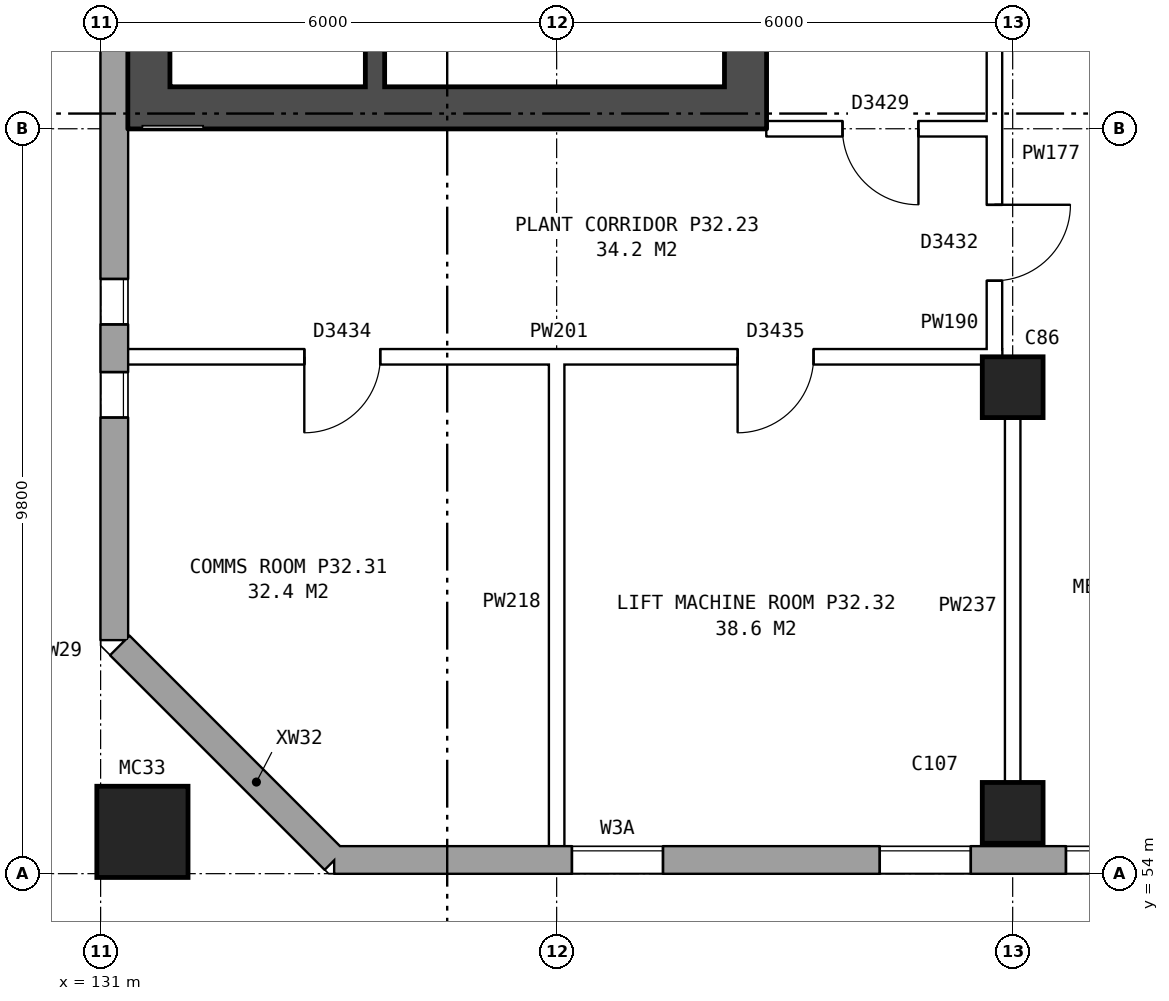
"""IFC4 building model, lengths in metres.
Left out: names, types, materials, properties, quantities, classifications, styles, units other than length and angle.
Written with IfcOpenShell. Run it as: python <this file> out.ifc"""

import sys

from ifc_helpers import new_model, si_unit, direction, frame, frame_2d, origin, origin_2d, place, context, subcontext, project, spatial, rectangle, hollow_rectangle, extrude, element, fill, save


model = new_model("IFC4")
c1 = context("Model", 3, precision=1e-05, world=origin(), true_north=direction((0.0, 1.0)))
c2 = subcontext(c1, "Body", "Model", "MODEL_VIEW")
j1 = project(units=[si_unit("LENGTHUNIT", "METRE"), si_unit("PLANEANGLEUNIT", "RADIAN")], contexts=[c1])
p1 = place(None, origin())
s1 = spatial("IfcSite", under=j1, at=p1, CompositionType="ELEMENT")
p2 = place(p1, origin())
s2 = spatial("IfcBuilding", under=s1, at=p2, CompositionType="ELEMENT")
p3 = place(p2, frame((0.0, 0.0, 115.0)))
s3 = spatial("IfcBuildingStorey", under=s2, at=p3, CompositionType="ELEMENT", Elevation=115.0)
for number, where, z_axis, x_axis in (
    (1, (143.0, 54.8, 0.0), (0.0, 0.0, 1.0), (1.0, 0.0, 0.0)),
    (2, (143.0, 60.4, 0.0), (0.0, 0.0, 1.0), (1.0, 0.0, 0.0)),
):
    element("IfcColumn", number, at=place(p3, frame(where, z_axis=z_axis, x_axis=x_axis)), inside=s3, PredefinedType="COLUMN", context=c2, shape_type="SweptSolid", body=[
        extrude(rectangle(XDim=0.8, YDim=0.8, at=origin_2d()), origin(), (0.0, 0.0, 1.0), 4.2),
    ])
p4 = place(p3, frame((131.55, 54.55, 0.0), z_axis=(0.0, 0.0, 1.0), x_axis=(1.0, 0.0, 0.0)))
e3 = element("IfcColumn", 3, at=p4, inside=s3, PredefinedType="COLUMN", context=c2, shape_type="SweptSolid", body=[
    extrude(hollow_rectangle(XDim=1.2, YDim=1.2, WallThickness=0.065, at=origin_2d()), origin(), (0.0, 0.0, 1.0), 4.5),
])
p5 = place(p3, frame((131.254, 57.001, 0.953), z_axis=(0.0, 0.0, 1.0), x_axis=(0.706994764273, -0.707218780358, 0.0)))
e4 = element("IfcWall", 4, at=p5, inside=s3, PredefinedType="STANDARD", context=c2, shape_type="SweptSolid", body=[
    extrude(rectangle(XDim=1.09, YDim=0.36, at=frame_2d((0.545, 0.0))), origin(), (0.0, 0.0, 1.0), 2.444),
])
p6 = place(p3, frame((132.024, 56.23, 0.0), z_axis=(0.0, 0.0, 1.0), x_axis=(0.707148882153, -0.707064677713, 0.0)))
e5 = element("IfcWall", 5, at=p6, inside=s3, PredefinedType="STANDARD", context=c2, shape_type="SweptSolid", body=[
    extrude(rectangle(XDim=2.899, YDim=0.36, at=frame_2d((1.45, 0.0))), origin(), (0.0, 0.0, 1.0), 4.2),
])
p7 = place(p3, frame((134.075, 54.18, 0.0), z_axis=(0.0, 0.0, 1.0), x_axis=(1.0, 0.0, 0.0)))
e6 = element("IfcWall", 6, at=p7, inside=s3, PredefinedType="STANDARD", context=c2, shape_type="SweptSolid", body=[
    extrude(rectangle(XDim=35.601, YDim=0.36, at=frame_2d((17.8, 0.0))), origin(), (0.0, 0.0, 1.0), 4.2),
])
p8 = place(p7, frame((3.125, 0.0, 1.5)))
e7 = element("IfcOpeningElement", 7, at=p8, cuts=e6, PredefinedType="OPENING", context=c2, shape_type="SweptSolid", body=[
    extrude(rectangle(XDim=1.2, YDim=1.2, at=frame_2d((0.6, 0.6))), frame((0.0, 0.19, 0.0), z_axis=(0.0, -1.0, 0.0), x_axis=(1.0, 0.0, 0.0)), (0.0, 0.0, 1.0), 0.38),
])
p9 = place(p7, frame((7.175, 0.0, 1.5)))
e8 = element("IfcOpeningElement", 8, at=p9, cuts=e6, PredefinedType="OPENING", context=c2, shape_type="SweptSolid", body=[
    extrude(rectangle(XDim=1.2, YDim=1.2, at=frame_2d((0.6, 0.6))), frame((0.0, 0.19, 0.0), z_axis=(0.0, -1.0, 0.0), x_axis=(1.0, 0.0, 0.0)), (0.0, 0.0, 1.0), 0.38),
])
p10 = place(p7, frame((9.625, 0.0, 1.5)))
e9 = element("IfcOpeningElement", 9, at=p10, cuts=e6, PredefinedType="OPENING", context=c2, shape_type="SweptSolid", body=[
    extrude(rectangle(XDim=1.6, YDim=1.2, at=frame_2d((0.8, 0.6))), frame((0.0, 0.19, 0.0), z_axis=(0.0, -1.0, 0.0), x_axis=(1.0, 0.0, 0.0)), (0.0, 0.0, 1.0), 0.38),
])
p11 = place(p7, frame((15.125, 0.0, 1.5)))
e10 = element("IfcOpeningElement", 10, at=p11, cuts=e6, PredefinedType="OPENING", context=c2, shape_type="SweptSolid", body=[
    extrude(rectangle(XDim=1.2, YDim=1.2, at=frame_2d((0.6, 0.6))), frame((0.0, 0.19, 0.0), z_axis=(0.0, -1.0, 0.0), x_axis=(1.0, 0.0, 0.0)), (0.0, 0.0, 1.0), 0.38),
])
p12 = place(p7, frame((19.125, 0.0, 1.5)))
e11 = element("IfcOpeningElement", 11, at=p12, cuts=e6, PredefinedType="OPENING", context=c2, shape_type="SweptSolid", body=[
    extrude(rectangle(XDim=0.6, YDim=1.2, at=frame_2d((0.3, 0.6))), frame((0.0, 0.19, 0.0), z_axis=(0.0, -1.0, 0.0), x_axis=(1.0, 0.0, 0.0)), (0.0, 0.0, 1.0), 0.38),
])
p13 = place(p7, frame((21.625, 0.0, 1.5)))
e12 = element("IfcOpeningElement", 12, at=p13, cuts=e6, PredefinedType="OPENING", context=c2, shape_type="SweptSolid", body=[
    extrude(rectangle(XDim=1.6, YDim=1.2, at=frame_2d((0.8, 0.6))), frame((0.0, 0.19, 0.0), z_axis=(0.0, -1.0, 0.0), x_axis=(1.0, 0.0, 0.0)), (0.0, 0.0, 1.0), 0.38),
])
p14 = place(p7, frame((26.375, 0.0, 1.5)))
e13 = element("IfcOpeningElement", 13, at=p14, cuts=e6, PredefinedType="OPENING", context=c2, shape_type="SweptSolid", body=[
    extrude(rectangle(XDim=1.6, YDim=1.2, at=frame_2d((0.8, 0.6))), frame((0.0, 0.19, 0.0), z_axis=(0.0, -1.0, 0.0), x_axis=(1.0, 0.0, 0.0)), (0.0, 0.0, 1.0), 0.38),
])
p15 = place(p7, frame((31.125, 0.0, 1.5)))
e14 = element("IfcOpeningElement", 14, at=p15, cuts=e6, PredefinedType="OPENING", context=c2, shape_type="SweptSolid", body=[
    extrude(rectangle(XDim=0.6, YDim=1.2, at=frame_2d((0.3, 0.6))), frame((0.0, 0.19, 0.0), z_axis=(0.0, -1.0, 0.0), x_axis=(1.0, 0.0, 0.0)), (0.0, 0.0, 1.0), 0.38),
])
p16 = place(p7, frame((33.625, 0.0, 1.5)))
e15 = element("IfcOpeningElement", 15, at=p16, cuts=e6, PredefinedType="OPENING", context=c2, shape_type="SweptSolid", body=[
    extrude(rectangle(XDim=1.6, YDim=1.2, at=frame_2d((0.8, 0.6))), frame((0.0, 0.19, 0.0), z_axis=(0.0, -1.0, 0.0), x_axis=(1.0, 0.0, 0.0)), (0.0, 0.0, 1.0), 0.38),
])
p17 = place(p7, frame((20.025, 0.0, 1.5)))
e16 = element("IfcOpeningElement", 16, at=p17, cuts=e6, PredefinedType="OPENING", context=c2, shape_type="SweptSolid", body=[
    extrude(rectangle(XDim=1.2, YDim=1.2, at=frame_2d((0.6, 0.6))), frame((0.0, 0.19, 0.0), z_axis=(0.0, -1.0, 0.0), x_axis=(1.0, 0.0, 0.0)), (0.0, 0.0, 1.0), 0.38),
])
p18 = place(p7, frame((32.025, 0.0, 1.5)))
e17 = element("IfcOpeningElement", 17, at=p18, cuts=e6, PredefinedType="OPENING", context=c2, shape_type="SweptSolid", body=[
    extrude(rectangle(XDim=1.2, YDim=1.2, at=frame_2d((0.6, 0.6))), frame((0.0, 0.19, 0.0), z_axis=(0.0, -1.0, 0.0), x_axis=(1.0, 0.0, 0.0)), (0.0, 0.0, 1.0), 0.38),
])
p19 = place(p3, frame((131.18, 82.925, 0.0), z_axis=(0.0, 0.0, 1.0), x_axis=(0.0, -1.0, 0.0)))
e18 = element("IfcWall", 18, at=p19, inside=s3, PredefinedType="STANDARD", context=c2, shape_type="SweptSolid", body=[
    extrude(rectangle(XDim=25.851, YDim=0.36, at=frame_2d((12.925, 0.0))), origin(), (0.0, 0.0, 1.0), 4.2),
])
p20 = place(p19, frame((2.9, 0.0, 1.5)))
e19 = element("IfcOpeningElement", 19, at=p20, cuts=e18, PredefinedType="OPENING", context=c2, shape_type="SweptSolid", body=[
    extrude(rectangle(XDim=0.6, YDim=1.2, at=frame_2d((0.3, 0.6))), frame((0.0, 0.19, 0.0), z_axis=(0.0, -1.0, 0.0), x_axis=(1.0, 0.0, 0.0)), (0.0, 0.0, 1.0), 0.38),
])
p21 = place(p19, frame((4.625, 0.0, 1.5)))
e20 = element("IfcOpeningElement", 20, at=p21, cuts=e18, PredefinedType="OPENING", context=c2, shape_type="SweptSolid", body=[
    extrude(rectangle(XDim=1.6, YDim=1.2, at=frame_2d((0.8, 0.6))), frame((0.0, 0.19, 0.0), z_axis=(0.0, -1.0, 0.0), x_axis=(1.0, 0.0, 0.0)), (0.0, 0.0, 1.0), 0.38),
])
p22 = place(p19, frame((21.1, 0.0, 1.5)))
e21 = element("IfcOpeningElement", 21, at=p22, cuts=e18, PredefinedType="OPENING", context=c2, shape_type="SweptSolid", body=[
    extrude(rectangle(XDim=0.6, YDim=1.2, at=frame_2d((0.3, 0.6))), frame((0.0, 0.19, 0.0), z_axis=(0.0, -1.0, 0.0), x_axis=(1.0, 0.0, 0.0)), (0.0, 0.0, 1.0), 0.38),
])
p23 = place(p19, frame((22.325, 0.0, 1.5)))
e22 = element("IfcOpeningElement", 22, at=p23, cuts=e18, PredefinedType="OPENING", context=c2, shape_type="SweptSolid", body=[
    extrude(rectangle(XDim=0.6, YDim=1.2, at=frame_2d((0.3, 0.6))), frame((0.0, 0.19, 0.0), z_axis=(0.0, -1.0, 0.0), x_axis=(1.0, 0.0, 0.0)), (0.0, 0.0, 1.0), 0.38),
])
p24 = place(p3, frame((139.485, 63.8, 0.0), z_axis=(0.0, 0.0, 1.0), x_axis=(0.0, 1.0, 0.0)))
e23 = element("IfcWall", 23, at=p24, inside=s3, PredefinedType="SHEAR", context=c2, shape_type="SweptSolid", body=[
    extrude(rectangle(XDim=12.4, YDim=0.55, at=frame_2d((6.2, 0.0))), origin(), (0.0, 0.0, 1.0), 4.2),
])
p25 = place(p24, frame((1.325, 0.0, 0.0)))
e24 = element("IfcOpeningElement", 24, at=p25, cuts=e23, PredefinedType="OPENING", context=c2, shape_type="SweptSolid", body=[
    extrude(rectangle(XDim=1.1, YDim=2.1, at=frame_2d((0.55, 1.05))), frame((0.0, 0.285, 0.0), z_axis=(0.0, -1.0, 0.0), x_axis=(1.0, 0.0, 0.0)), (0.0, 0.0, 1.0), 0.57),
])
p26 = place(p24, frame((9.9, 0.0, 0.0)))
e25 = element("IfcOpeningElement", 25, at=p26, cuts=e23, PredefinedType="OPENING", context=c2, shape_type="SweptSolid", body=[
    extrude(rectangle(XDim=1.1, YDim=2.1, at=frame_2d((0.55, 1.05))), frame((0.0, 0.285, 0.0), z_axis=(0.0, -1.0, 0.0), x_axis=(1.0, 0.0, 0.0)), (0.0, 0.0, 1.0), 0.57),
])
p27 = place(p24, frame((8.125, 0.0, 0.0)))
e26 = element("IfcOpeningElement", 26, at=p27, cuts=e23, PredefinedType="OPENING", context=c2, shape_type="SweptSolid", body=[
    extrude(rectangle(XDim=0.85, YDim=2.1, at=frame_2d((0.425, 1.05))), frame((0.0, 0.285, 0.0), z_axis=(0.0, -1.0, 0.0), x_axis=(1.0, 0.0, 0.0)), (0.0, 0.0, 1.0), 0.57),
])
p28 = place(p3, frame((131.635, 63.8, 0.0), z_axis=(0.0, 0.0, 1.0), x_axis=(0.0, 1.0, 0.0)))
e27 = element("IfcWall", 27, at=p28, inside=s3, PredefinedType="SHEAR", context=c2, shape_type="SweptSolid", body=[
    extrude(rectangle(XDim=12.4, YDim=0.55, at=frame_2d((6.2, 0.0))), origin(), (0.0, 0.0, 1.0), 4.2),
])
p29 = place(p3, frame((139.21, 64.075, 0.0), z_axis=(0.0, 0.0, 1.0), x_axis=(-1.0, 0.0, 0.0)))
e28 = element("IfcWall", 28, at=p29, inside=s3, PredefinedType="SHEAR", context=c2, shape_type="SweptSolid", body=[
    extrude(rectangle(XDim=7.3, YDim=0.55, at=frame_2d((3.65, 0.0))), origin(), (0.0, 0.0, 1.0), 4.2),
])
p30 = place(p3, frame((134.61, 64.35, 0.0), z_axis=(0.0, 0.0, 1.0), x_axis=(0.0, 1.0, 0.0)))
e29 = element("IfcWall", 29, at=p30, inside=s3, PredefinedType="SHEAR", context=c2, shape_type="SweptSolid", body=[
    extrude(rectangle(XDim=6.775, YDim=0.25, at=frame_2d((3.387, 0.0))), origin(), (0.0, 0.0, 1.0), 4.2),
])
p31 = place(p3, frame((142.76, 63.9, 0.0), z_axis=(0.0, 0.0, 1.0), x_axis=(0.0, 1.0, 0.0)))
e30 = element("IfcWall", 30, at=p31, inside=s3, PredefinedType="PARTITIONING", context=c2, shape_type="SweptSolid", body=[
    extrude(rectangle(XDim=12.2, YDim=0.2, at=frame_2d((6.1, 0.0))), origin(), (0.0, 0.0, 1.0), 4.2),
])
p32 = place(p31, frame((5.1, 0.0, 0.0)))
e31 = element("IfcOpeningElement", 31, at=p32, cuts=e30, PredefinedType="OPENING", context=c2, shape_type="SweptSolid", body=[
    extrude(rectangle(XDim=2.0, YDim=2.1, at=frame_2d((1.0, 1.05))), frame((0.0, 0.11, 0.0), z_axis=(0.0, -1.0, 0.0), x_axis=(1.0, 0.0, 0.0)), (0.0, 0.0, 1.0), 0.22),
])
p33 = place(p3, frame((131.24, 60.8, 0.0), z_axis=(0.0, 0.0, 1.0), x_axis=(1.0, 0.0, 0.0)))
e32 = element("IfcWall", 32, at=p33, inside=s3, PredefinedType="PARTITIONING", context=c2, shape_type="SweptSolid", body=[
    extrude(rectangle(XDim=11.622, YDim=0.2, at=frame_2d((5.811, 0.0))), origin(), (0.0, 0.0, 1.0), 4.2),
])
p34 = place(p33, frame((2.44, 0.0, 0.0)))
e33 = element("IfcOpeningElement", 33, at=p34, cuts=e32, PredefinedType="OPENING", context=c2, shape_type="SweptSolid", body=[
    extrude(rectangle(XDim=1.0, YDim=2.1, at=frame_2d((0.5, 1.05))), frame((0.0, 0.11, 0.0), z_axis=(0.0, -1.0, 0.0), x_axis=(1.0, 0.0, 0.0)), (0.0, 0.0, 1.0), 0.22),
])
p35 = place(p33, frame((8.141, 0.0, 0.0)))
e34 = element("IfcOpeningElement", 34, at=p35, cuts=e32, PredefinedType="OPENING", context=c2, shape_type="SweptSolid", body=[
    extrude(rectangle(XDim=1.0, YDim=2.1, at=frame_2d((0.5, 1.05))), frame((0.0, 0.11, 0.0), z_axis=(0.0, -1.0, 0.0), x_axis=(1.0, 0.0, 0.0)), (0.0, 0.0, 1.0), 0.22),
])
p36 = place(p3, frame((139.76, 63.8, 0.0), z_axis=(0.0, 0.0, 1.0), x_axis=(1.0, 0.0, 0.0)))
e35 = element("IfcWall", 35, at=p36, inside=s3, PredefinedType="PARTITIONING", context=c2, shape_type="SweptSolid", body=[
    extrude(rectangle(XDim=3.1, YDim=0.2, at=frame_2d((1.55, 0.0))), origin(), (0.0, 0.0, 1.0), 4.2),
])
p37 = place(p36, frame((1.0, 0.0, 0.0)))
e36 = element("IfcOpeningElement", 36, at=p37, cuts=e35, PredefinedType="OPENING", context=c2, shape_type="SweptSolid", body=[
    extrude(rectangle(XDim=1.0, YDim=2.1, at=frame_2d((0.5, 1.05))), frame((0.0, 0.11, 0.0), z_axis=(0.0, -1.0, 0.0), x_axis=(1.0, 0.0, 0.0)), (0.0, 0.0, 1.0), 0.22),
])
p38 = place(p3, frame((137.0, 54.24, 0.0), z_axis=(0.0, 0.0, 1.0), x_axis=(0.0, 1.0, 0.0)))
e37 = element("IfcWall", 37, at=p38, inside=s3, PredefinedType="PARTITIONING", context=c2, shape_type="SweptSolid", body=[
    extrude(rectangle(XDim=6.66, YDim=0.2, at=frame_2d((3.33, 0.0))), origin(), (0.0, 0.0, 1.0), 4.2),
])
p39 = place(p3, frame((142.76, 60.7, 0.0), z_axis=(0.0, 0.0, 1.0), x_axis=(0.0, 1.0, 0.0)))
e38 = element("IfcWall", 38, at=p39, inside=s3, PredefinedType="PARTITIONING", context=c2, shape_type="SweptSolid", body=[
    extrude(rectangle(XDim=3.2, YDim=0.2, at=frame_2d((1.6, 0.0))), origin(), (0.0, 0.0, 1.0), 4.2),
])
p40 = place(p39, frame((1.1, 0.0, 0.0)))
e39 = element("IfcOpeningElement", 39, at=p40, cuts=e38, PredefinedType="OPENING", context=c2, shape_type="SweptSolid", body=[
    extrude(rectangle(XDim=1.0, YDim=2.1, at=frame_2d((0.5, 1.05))), frame((0.0, 0.11, 0.0), z_axis=(0.0, -1.0, 0.0), x_axis=(1.0, 0.0, 0.0)), (0.0, 0.0, 1.0), 0.22),
])
p41 = place(p3, frame((143.0, 54.24, 0.0), z_axis=(0.0, 0.0, 1.0), x_axis=(0.0, 1.0, 0.0)))
e40 = element("IfcWall", 40, at=p41, inside=s3, PredefinedType="PARTITIONING", context=c2, shape_type="SweptSolid", body=[
    extrude(rectangle(XDim=6.56, YDim=0.2, at=frame_2d((3.28, 0.0))), origin(), (0.0, 0.0, 1.0), 4.2),
])
p42 = place(p8, origin())
e41 = element("IfcWindow", 41, at=p42, inside=s3, PartitioningType="DOUBLE_PANEL_HORIZONTAL", PredefinedType="WINDOW", context=c2, shape_type="SweptSolid", body=[
    extrude(rectangle(XDim=1.2, YDim=1.2, at=frame_2d((0.6, 0.6))), frame((0.0, 0.15, 0.0), z_axis=(0.0, -1.0, 0.0), x_axis=(1.0, 0.0, 0.0)), (0.0, 0.0, 1.0), 0.06),
])
fill(e7, e41)
p43 = place(p9, origin())
e42 = element("IfcWindow", 42, at=p43, inside=s3, PartitioningType="DOUBLE_PANEL_HORIZONTAL", PredefinedType="WINDOW", context=c2, shape_type="SweptSolid", body=[
    extrude(rectangle(XDim=1.2, YDim=1.2, at=frame_2d((0.6, 0.6))), frame((0.0, 0.15, 0.0), z_axis=(0.0, -1.0, 0.0), x_axis=(1.0, 0.0, 0.0)), (0.0, 0.0, 1.0), 0.06),
])
fill(e8, e42)
p44 = place(p10, origin())
e43 = element("IfcWindow", 43, at=p44, inside=s3, PartitioningType="DOUBLE_PANEL_HORIZONTAL", PredefinedType="WINDOW", context=c2, shape_type="SweptSolid", body=[
    extrude(rectangle(XDim=1.6, YDim=1.2, at=frame_2d((0.8, 0.6))), frame((0.0, 0.15, 0.0), z_axis=(0.0, -1.0, 0.0), x_axis=(1.0, 0.0, 0.0)), (0.0, 0.0, 1.0), 0.06),
])
fill(e9, e43)
p45 = place(p22, origin())
e44 = element("IfcWindow", 44, at=p45, inside=s3, PartitioningType="DOUBLE_PANEL_HORIZONTAL", PredefinedType="WINDOW", context=c2, shape_type="SweptSolid", body=[
    extrude(rectangle(XDim=0.6, YDim=1.2, at=frame_2d((0.3, 0.6))), frame((0.0, 0.15, 0.0), z_axis=(0.0, -1.0, 0.0), x_axis=(1.0, 0.0, 0.0)), (0.0, 0.0, 1.0), 0.06),
])
fill(e21, e44)
p46 = place(p23, origin())
e45 = element("IfcWindow", 45, at=p46, inside=s3, PartitioningType="DOUBLE_PANEL_HORIZONTAL", PredefinedType="WINDOW", context=c2, shape_type="SweptSolid", body=[
    extrude(rectangle(XDim=0.6, YDim=1.2, at=frame_2d((0.3, 0.6))), frame((0.0, 0.15, 0.0), z_axis=(0.0, -1.0, 0.0), x_axis=(1.0, 0.0, 0.0)), (0.0, 0.0, 1.0), 0.06),
])
fill(e22, e45)
p47 = place(p34, frame((1.0, 0.0, 0.0), z_axis=(0.0, 0.0, 1.0), x_axis=(-1.0, 0.0, 0.0)))
e46 = element("IfcDoor", 46, at=p47, inside=s3, OperationType="SINGLE_SWING_RIGHT", PredefinedType="DOOR", context=c2, shape_type="SweptSolid", body=[
    extrude(rectangle(XDim=1.0, YDim=2.1, at=frame_2d((0.5, 1.05))), frame((0.0, 0.025, 0.0), z_axis=(0.0, -1.0, 0.0), x_axis=(1.0, 0.0, 0.0)), (0.0, 0.0, 1.0), 0.05),
])
fill(e33, e46)
p48 = place(p35, frame((1.0, 0.0, 0.0), z_axis=(0.0, 0.0, 1.0), x_axis=(-1.0, 0.0, 0.0)))
e47 = element("IfcDoor", 47, at=p48, inside=s3, OperationType="SINGLE_SWING_RIGHT", PredefinedType="DOOR", context=c2, shape_type="SweptSolid", body=[
    extrude(rectangle(XDim=1.0, YDim=2.1, at=frame_2d((0.5, 1.05))), frame((0.0, 0.025, 0.0), z_axis=(0.0, -1.0, 0.0), x_axis=(1.0, 0.0, 0.0)), (0.0, 0.0, 1.0), 0.05),
])
fill(e34, e47)
p49 = place(p37, frame((1.0, 0.0, 0.0), z_axis=(0.0, 0.0, 1.0), x_axis=(-1.0, 0.0, 0.0)))
e48 = element("IfcDoor", 48, at=p49, inside=s3, OperationType="SINGLE_SWING_LEFT", PredefinedType="DOOR", context=c2, shape_type="SweptSolid", body=[
    extrude(rectangle(XDim=1.0, YDim=2.1, at=frame_2d((0.5, 1.05))), frame((0.0, 0.025, 0.0), z_axis=(0.0, -1.0, 0.0), x_axis=(1.0, 0.0, 0.0)), (0.0, 0.0, 1.0), 0.05),
])
fill(e36, e48)
p50 = place(p40, frame((1.0, 0.0, 0.0), z_axis=(0.0, 0.0, 1.0), x_axis=(-1.0, 0.0, 0.0)))
e49 = element("IfcDoor", 49, at=p50, inside=s3, OperationType="SINGLE_SWING_LEFT", PredefinedType="DOOR", context=c2, shape_type="SweptSolid", body=[
    extrude(rectangle(XDim=1.0, YDim=2.1, at=frame_2d((0.5, 1.05))), frame((0.0, 0.025, 0.0), z_axis=(0.0, -1.0, 0.0), x_axis=(1.0, 0.0, 0.0)), (0.0, 0.0, 1.0), 0.05),
])
fill(e39, e49)
save(model, sys.argv[1])
